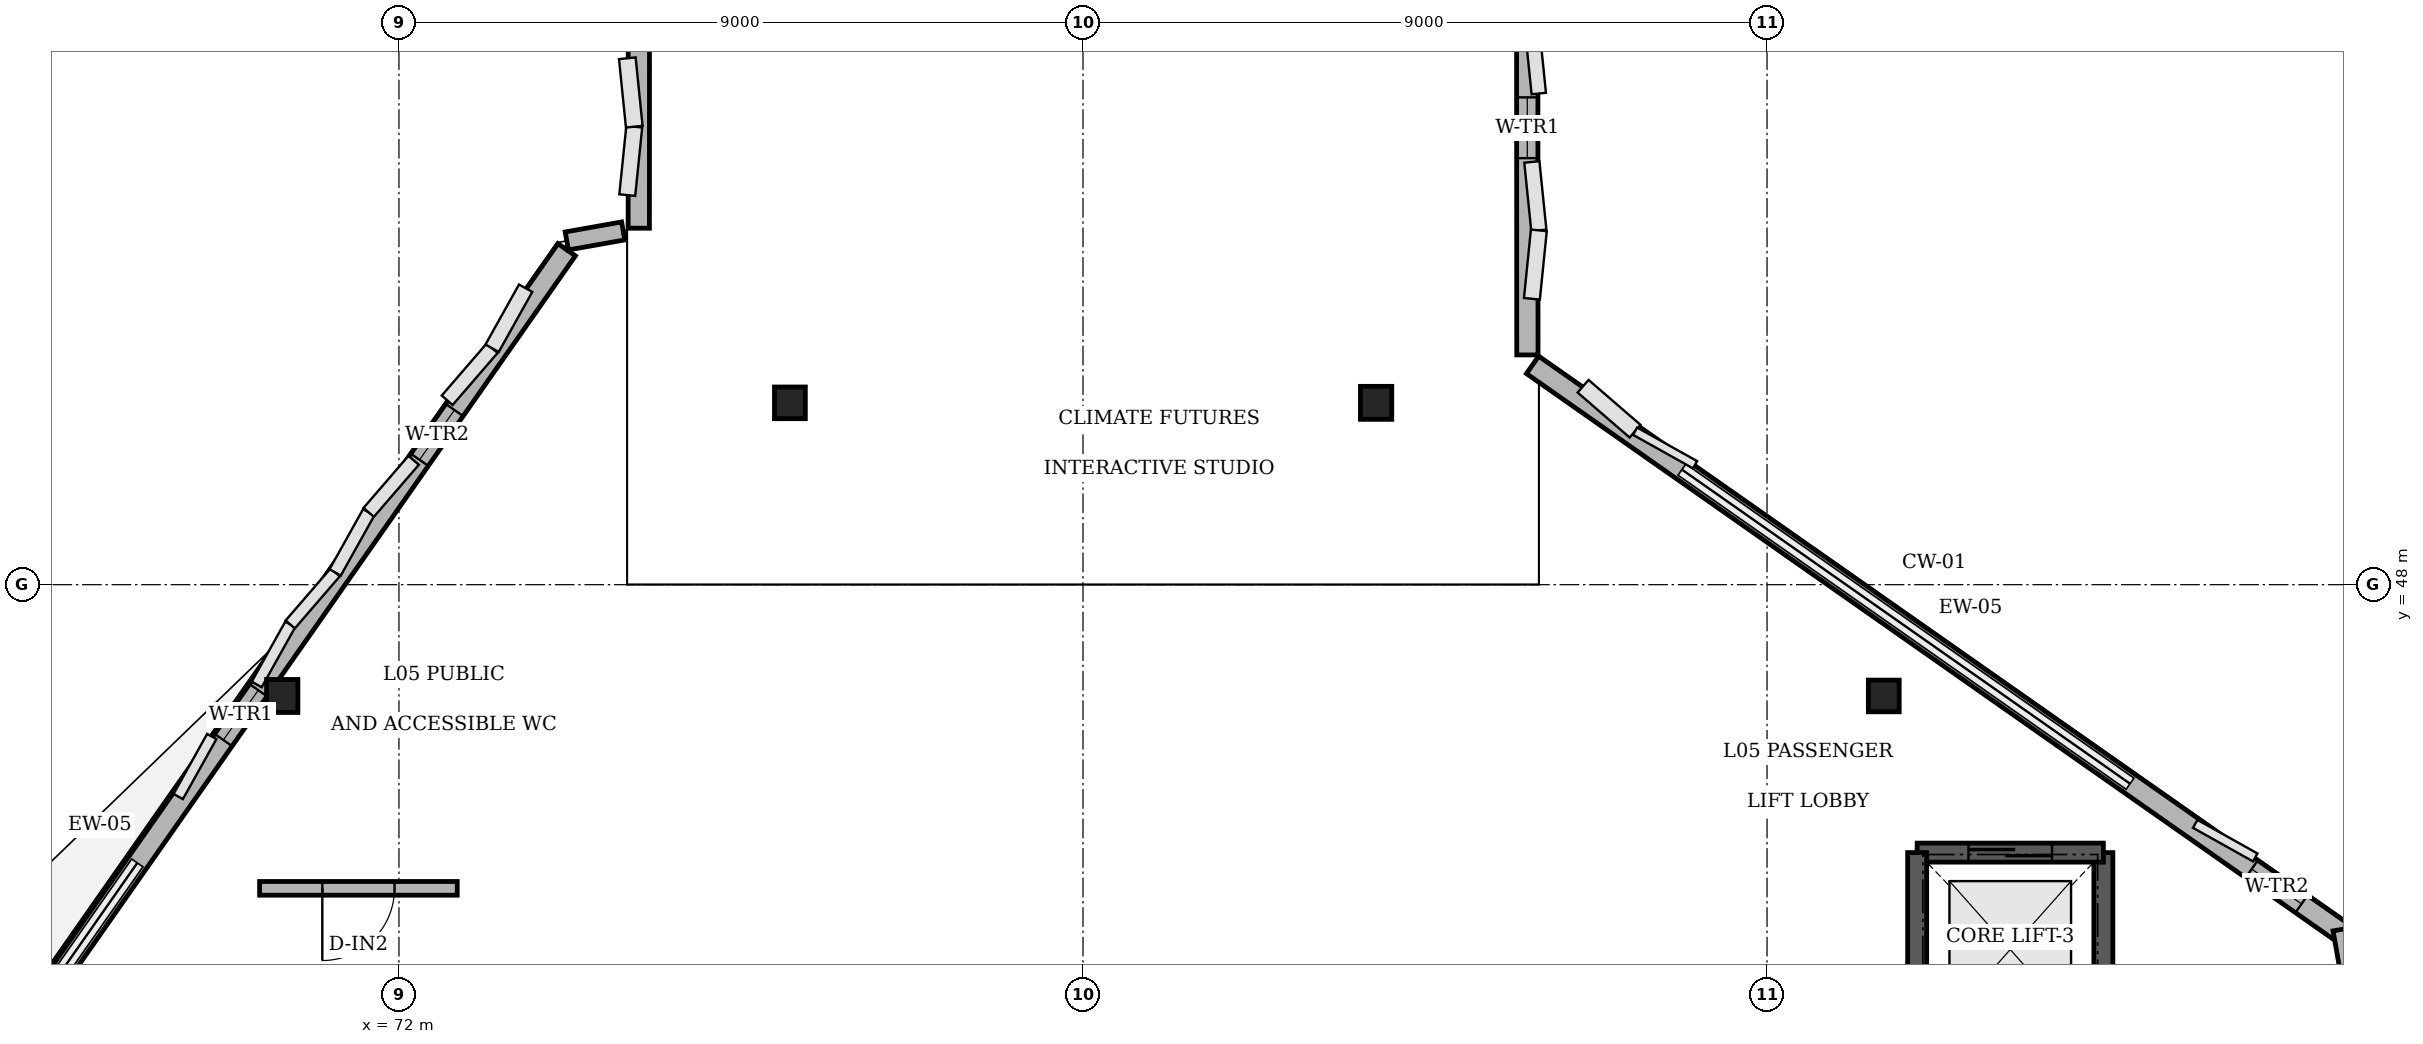
"""IFC4 building model, lengths in metres.
Left out: names, types, materials, properties, quantities, classifications, styles, units other than length and angle.
Written with IfcOpenShell. Run it as: python <this file> out.ifc"""

import sys

from ifc_helpers import new_model, si_unit, direction, frame, frame_2d, origin, origin_2d, place, context, subcontext, project, spatial, rectangle, i_section, extrude, element, fill, save


model = new_model("IFC4")
c1 = context("Model", 3, precision=1e-05, world=origin(), true_north=direction((0.0, 1.0)))
c2 = subcontext(c1, "Body", "Model", "MODEL_VIEW")
j1 = project(units=[si_unit("LENGTHUNIT", "METRE"), si_unit("PLANEANGLEUNIT", "RADIAN")], contexts=[c1])
p1 = place(None, origin())
s1 = spatial("IfcSite", under=j1, at=p1, CompositionType="ELEMENT")
p2 = place(p1, origin())
s2 = spatial("IfcBuilding", under=s1, at=p2, CompositionType="ELEMENT")
p3 = place(p2, frame((0.0, 0.0, 25.2)))
s3 = spatial("IfcBuildingStorey", under=s2, at=p3, CompositionType="ELEMENT", Elevation=25.2)
p4 = place(p3, frame((91.536, 46.536, 0.0), z_axis=(0.0, 0.0, 1.0), x_axis=(1.0, 0.0, 0.0)))
e1 = element("IfcColumn", 1, at=p4, inside=s3, PredefinedType="COLUMN", context=c2, shape_type="SweptSolid", body=[
    extrude(i_section(OverallWidth=0.406, OverallDepth=0.417, WebThickness=0.03, FlangeThickness=0.044, FilletRadius=0.015, at=origin_2d()), origin(), (0.0, 0.0, 1.0), 5.55),
])
p5 = place(p3, frame((84.856, 50.392, 0.0), z_axis=(0.0, 0.0, 1.0), x_axis=(1.0, 0.0, 0.0)))
e2 = element("IfcColumn", 2, at=p5, inside=s3, PredefinedType="COLUMN", context=c2, shape_type="SweptSolid", body=[
    extrude(i_section(OverallWidth=0.412, OverallDepth=0.434, WebThickness=0.036, FlangeThickness=0.044, FilletRadius=0.015, at=origin_2d()), origin(), (0.0, 0.0, 1.0), 5.55),
])
p6 = place(p3, frame((77.144, 50.392, 0.0), z_axis=(0.0, 0.0, 1.0), x_axis=(1.0, 0.0, 0.0)))
e3 = element("IfcColumn", 3, at=p6, inside=s3, PredefinedType="COLUMN", context=c2, shape_type="SweptSolid", body=[
    extrude(i_section(OverallWidth=0.406, OverallDepth=0.417, WebThickness=0.03, FlangeThickness=0.044, FilletRadius=0.015, at=origin_2d()), origin(), (0.0, 0.0, 1.0), 5.55),
])
p7 = place(p3, frame((70.464, 46.536, 0.0), z_axis=(0.0, 0.0, 1.0), x_axis=(1.0, 0.0, 0.0)))
e4 = element("IfcColumn", 4, at=p7, inside=s3, PredefinedType="COLUMN", context=c2, shape_type="SweptSolid", body=[
    extrude(i_section(OverallWidth=0.412, OverallDepth=0.434, WebThickness=0.036, FlangeThickness=0.044, FilletRadius=0.015, at=origin_2d()), origin(), (0.0, 0.0, 1.0), 5.55),
])
p8 = place(p3, frame((86.84, 66.0, 0.0), z_axis=(0.0, 0.0, 1.0), x_axis=(0.000456419989, -0.99999989584, 0.0)))
e5 = element("IfcWall", 5, at=p8, inside=s3, PredefinedType="SOLIDWALL", context=c2, shape_type="SweptSolid", body=[
    extrude(rectangle(XDim=14.977, YDim=0.28, at=frame_2d((7.489, 0.0))), origin(), (0.0, 0.0, 1.0), 2.45),
])
p9 = place(p8, frame((11.589, 0.0, 0.6)))
e6 = element("IfcOpeningElement", 6, at=p9, cuts=e5, PredefinedType="OPENING", context=c2, shape_type="SweptSolid", body=[
    extrude(rectangle(XDim=0.8, YDim=1.5, at=frame_2d((0.4, 0.75))), frame((0.0, 0.15, 0.0), z_axis=(0.0, -1.0, 0.0), x_axis=(1.0, 0.0, 0.0)), (0.0, 0.0, 1.0), 0.3),
])
p10 = place(p3, frame((86.915, 50.892, 0.0), z_axis=(0.0, 0.0, 1.0), x_axis=(0.818859952537, -0.573993360704, 0.0)))
e7 = element("IfcWall", 7, at=p10, inside=s3, PredefinedType="SOLIDWALL", context=c2, shape_type="SweptSolid", body=[
    extrude(rectangle(XDim=13.111, YDim=0.28, at=frame_2d((6.556, 0.0))), origin(), (0.0, 0.0, 1.0), 2.45),
])
p11 = place(p10, frame((11.555, 0.0, 0.6)))
e8 = element("IfcOpeningElement", 8, at=p11, cuts=e7, PredefinedType="OPENING", context=c2, shape_type="SweptSolid", body=[
    extrude(rectangle(XDim=0.8, YDim=1.7, at=frame_2d((0.4, 0.85))), frame((0.0, 0.15, 0.0), z_axis=(0.0, -1.0, 0.0), x_axis=(1.0, 0.0, 0.0)), (0.0, 0.0, 1.0), 0.3),
])
p12 = place(p3, frame((97.585, 43.469, 0.0), z_axis=(0.0, 0.0, 1.0), x_axis=(0.173639194339, -0.984809336973, 0.0)))
e9 = element("IfcWall", 9, at=p12, inside=s3, PredefinedType="SOLIDWALL", context=c2, shape_type="SweptSolid", body=[
    extrude(rectangle(XDim=8.768, YDim=0.28, at=frame_2d((4.384, 0.0))), origin(), (0.0, 0.0, 1.0), 4.14),
])
p13 = place(p12, frame((2.609, 0.0, 1.05)))
e10 = element("IfcOpeningElement", 10, at=p13, cuts=e9, PredefinedType="OPENING", context=c2, shape_type="SweptSolid", body=[
    extrude(rectangle(XDim=0.85, YDim=1.6, at=frame_2d((0.425, 0.8))), frame((0.0, 0.15, 0.0), z_axis=(0.0, -1.0, 0.0), x_axis=(1.0, 0.0, 0.0)), (0.0, 0.0, 1.0), 0.3),
])
p14 = place(p12, frame((7.134, 0.0, 1.05)))
e11 = element("IfcOpeningElement", 11, at=p14, cuts=e9, PredefinedType="OPENING", context=c2, shape_type="SweptSolid", body=[
    extrude(rectangle(XDim=0.8, YDim=1.5, at=frame_2d((0.4, 0.75))), frame((0.0, 0.15, 0.0), z_axis=(0.0, -1.0, 0.0), x_axis=(1.0, 0.0, 0.0)), (0.0, 0.0, 1.0), 0.3),
])
p15 = place(p3, frame((63.051, 36.475, 0.0), z_axis=(0.0, 0.0, 1.0), x_axis=(0.573576074944, 0.819152297349, 0.0)))
e12 = element("IfcWall", 12, at=p15, inside=s3, PredefinedType="SOLIDWALL", context=c2, shape_type="SweptSolid", body=[
    extrude(rectangle(XDim=19.449, YDim=0.28, at=frame_2d((9.724, 0.0))), origin(), (0.0, 0.0, 1.0), 2.45),
])
p16 = place(p15, frame((11.574, 0.0, 0.6)))
e13 = element("IfcOpeningElement", 13, at=p16, cuts=e12, PredefinedType="OPENING", context=c2, shape_type="SweptSolid", body=[
    extrude(rectangle(XDim=0.8, YDim=1.5, at=frame_2d((0.4, 0.75))), frame((0.0, 0.15, 0.0), z_axis=(0.0, -1.0, 0.0), x_axis=(1.0, 0.0, 0.0)), (0.0, 0.0, 1.0), 0.3),
])
p17 = place(p15, frame((16.074, 0.0, 0.6)))
e14 = element("IfcOpeningElement", 14, at=p17, cuts=e12, PredefinedType="OPENING", context=c2, shape_type="SweptSolid", body=[
    extrude(rectangle(XDim=0.8, YDim=1.7, at=frame_2d((0.4, 0.85))), frame((0.0, 0.15, 0.0), z_axis=(0.0, -1.0, 0.0), x_axis=(1.0, 0.0, 0.0)), (0.0, 0.0, 1.0), 0.3),
])
p18 = place(p3, frame((74.208, 52.522, 0.0), z_axis=(0.0, 0.0, 1.0), x_axis=(0.984633151957, 0.174635494868, 0.0)))
e15 = element("IfcWall", 15, at=p18, inside=s3, PredefinedType="SOLIDWALL", context=c2, shape_type="SweptSolid", body=[
    extrude(rectangle(XDim=0.753, YDim=0.24, at=frame_2d((0.377, 0.0))), origin(), (0.0, 0.0, 1.0), 4.14),
])
p19 = place(p3, frame((75.155, 52.69, 0.0), z_axis=(0.0, 0.0, 1.0), x_axis=(0.000376521749, 0.999999929116, 0.0)))
e16 = element("IfcWall", 16, at=p19, inside=s3, PredefinedType="SOLIDWALL", context=c2, shape_type="SweptSolid", body=[
    extrude(rectangle(XDim=11.671, YDim=0.28, at=frame_2d((5.836, 0.0))), origin(), (0.0, 0.0, 1.0), 2.45),
])
p20 = place(p3, frame((94.425, 41.925, 0.0), z_axis=(0.0, 0.0, 1.0), x_axis=(0.0, 1.0, 0.0)))
e17 = element("IfcWall", 17, at=p20, inside=s3, PredefinedType="SOLIDWALL", context=c2, shape_type="SweptSolid", body=[
    extrude(rectangle(XDim=2.55, YDim=0.25, at=frame_2d((1.275, 0.0))), origin(), (0.0, 0.0, 1.0), 4.8),
])
p21 = place(p3, frame((94.425, 44.475, 0.0), z_axis=(0.0, 0.0, 1.0), x_axis=(-1.0, 0.0, 0.0)))
e18 = element("IfcWall", 18, at=p21, inside=s3, PredefinedType="SOLIDWALL", context=c2, shape_type="SweptSolid", body=[
    extrude(rectangle(XDim=2.45, YDim=0.25, at=frame_2d((1.225, 0.0))), origin(), (0.0, 0.0, 1.0), 4.8),
])
p22 = place(p21, frame((0.675, 0.0, 0.0)))
e19 = element("IfcOpeningElement", 19, at=p22, cuts=e18, PredefinedType="OPENING", context=c2, shape_type="SweptSolid", body=[
    extrude(rectangle(XDim=1.1, YDim=2.2, at=frame_2d((0.55, 1.1))), frame((0.0, 0.135, 0.0), z_axis=(0.0, -1.0, 0.0), x_axis=(1.0, 0.0, 0.0)), (0.0, 0.0, 1.0), 0.27),
])
p23 = place(p3, frame((91.975, 44.475, 0.0), z_axis=(0.0, 0.0, 1.0), x_axis=(0.0, -1.0, 0.0)))
e20 = element("IfcWall", 20, at=p23, inside=s3, PredefinedType="SOLIDWALL", context=c2, shape_type="SweptSolid", body=[
    extrude(rectangle(XDim=2.55, YDim=0.25, at=frame_2d((1.275, 0.0))), origin(), (0.0, 0.0, 1.0), 4.8),
])
p24 = place(p3, frame((72.767, 44.005, 0.0), z_axis=(0.0, 0.0, 1.0), x_axis=(-1.0, 0.0, 0.0)))
e21 = element("IfcWall", 21, at=p24, inside=s3, PredefinedType="PARTITIONING", context=c2, shape_type="SweptSolid", body=[
    extrude(rectangle(XDim=2.6, YDim=0.18, at=frame_2d((1.3, 0.0))), origin(), (0.0, 0.0, 1.0), 3.15),
])
p25 = place(p24, frame((0.825, 0.0, 0.0)))
e22 = element("IfcOpeningElement", 22, at=p25, cuts=e21, PredefinedType="OPENING", context=c2, shape_type="SweptSolid", body=[
    extrude(rectangle(XDim=0.95, YDim=2.15, at=frame_2d((0.475, 1.075))), frame((0.0, 0.1, 0.0), z_axis=(0.0, -1.0, 0.0), x_axis=(1.0, 0.0, 0.0)), (0.0, 0.0, 1.0), 0.2),
])
p26 = place(p9, origin())
e23 = element("IfcWindow", 23, at=p26, inside=s3, PartitioningType="SINGLE_PANEL", PredefinedType="WINDOW", context=c2, shape_type="SweptSolid", body=[
    extrude(rectangle(XDim=0.8, YDim=1.5, at=frame_2d((0.4, 0.75))), frame((0.0, 0.03, 0.0), z_axis=(0.0, -1.0, 0.0), x_axis=(1.0, 0.0, 0.0)), (0.0, 0.0, 1.0), 0.06),
])
fill(e6, e23)
p27 = place(p11, origin())
e24 = element("IfcWindow", 24, at=p27, inside=s3, PartitioningType="SINGLE_PANEL", PredefinedType="WINDOW", context=c2, shape_type="SweptSolid", body=[
    extrude(rectangle(XDim=0.8, YDim=1.7, at=frame_2d((0.4, 0.85))), frame((0.0, 0.03, 0.0), z_axis=(0.0, -1.0, 0.0), x_axis=(1.0, 0.0, 0.0)), (0.0, 0.0, 1.0), 0.06),
])
fill(e8, e24)
p28 = place(p16, origin())
e25 = element("IfcWindow", 25, at=p28, inside=s3, PartitioningType="SINGLE_PANEL", PredefinedType="WINDOW", context=c2, shape_type="SweptSolid", body=[
    extrude(rectangle(XDim=0.8, YDim=1.5, at=frame_2d((0.4, 0.75))), frame((0.0, 0.03, 0.0), z_axis=(0.0, -1.0, 0.0), x_axis=(1.0, 0.0, 0.0)), (0.0, 0.0, 1.0), 0.06),
])
fill(e13, e25)
p29 = place(p17, origin())
e26 = element("IfcWindow", 26, at=p29, inside=s3, PartitioningType="SINGLE_PANEL", PredefinedType="WINDOW", context=c2, shape_type="SweptSolid", body=[
    extrude(rectangle(XDim=0.8, YDim=1.7, at=frame_2d((0.4, 0.85))), frame((0.0, 0.03, 0.0), z_axis=(0.0, -1.0, 0.0), x_axis=(1.0, 0.0, 0.0)), (0.0, 0.0, 1.0), 0.06),
])
fill(e14, e26)
p30 = place(p22, origin())
e27 = element("IfcDoor", 27, at=p30, inside=s3, OperationType="SLIDING_TO_LEFT", PredefinedType="DOOR", context=c2, shape_type="SweptSolid", body=[
    extrude(rectangle(XDim=1.1, YDim=2.2, at=frame_2d((0.55, 1.1))), frame((0.0, 0.025, 0.0), z_axis=(0.0, -1.0, 0.0), x_axis=(1.0, 0.0, 0.0)), (0.0, 0.0, 1.0), 0.05),
])
fill(e19, e27)
p31 = place(p25, origin())
e28 = element("IfcDoor", 28, at=p31, inside=s3, OperationType="SINGLE_SWING_RIGHT", PredefinedType="DOOR", context=c2, shape_type="SweptSolid", body=[
    extrude(rectangle(XDim=0.95, YDim=2.15, at=frame_2d((0.475, 1.075))), frame((0.0, 0.025, 0.0), z_axis=(0.0, -1.0, 0.0), x_axis=(1.0, 0.0, 0.0)), (0.0, 0.0, 1.0), 0.05),
])
fill(e22, e28)
save(model, sys.argv[1])
